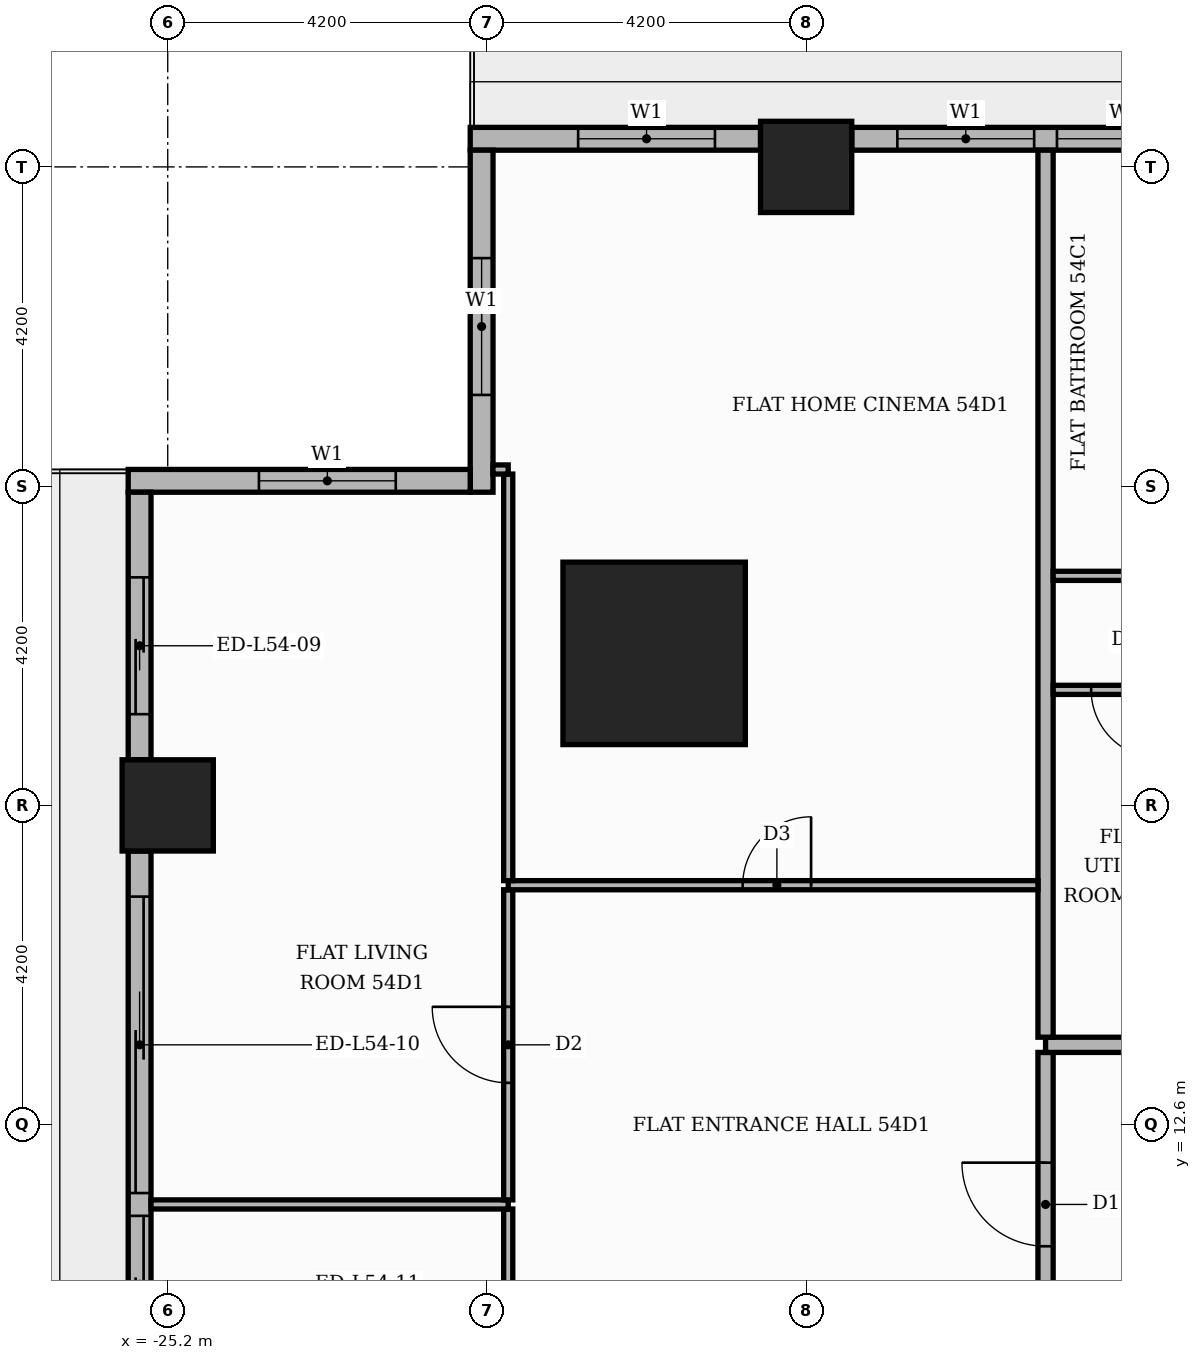
"""IFC4 building model, lengths in metres.
Left out: names, types, materials, properties, quantities, classifications, styles, units other than length and angle.
Written with IfcOpenShell. Run it as: python <this file> out.ifc"""

import sys

from ifc_helpers import new_model, si_unit, direction, frame, frame_2d, origin, origin_2d, place, context, subcontext, project, spatial, rectangle, extrude, element, fill, save


model = new_model("IFC4")
c1 = context("Model", 3, precision=1e-05, world=origin(), true_north=direction((0.0, 1.0)))
c2 = subcontext(c1, "Body", "Model", "MODEL_VIEW")
j1 = project(units=[si_unit("LENGTHUNIT", "METRE"), si_unit("PLANEANGLEUNIT", "RADIAN")], contexts=[c1])
p1 = place(None, origin())
s1 = spatial("IfcSite", under=j1, at=p1, CompositionType="ELEMENT")
p2 = place(p1, origin())
s2 = spatial("IfcBuilding", under=s1, at=p2, CompositionType="ELEMENT")
p3 = place(p2, frame((0.0, 0.0, 227.4)))
s3 = spatial("IfcBuildingStorey", under=s2, at=p3, CompositionType="ELEMENT", Elevation=227.4)
p4 = place(p3, frame((-18.8, 18.8, 0.0), z_axis=(0.0, 0.0, 1.0), x_axis=(1.0, 0.0, 0.0)))
e1 = element("IfcColumn", 1, at=p4, inside=s3, PredefinedType="COLUMN", context=c2, shape_type="SweptSolid", body=[
    extrude(rectangle(XDim=2.4, YDim=2.4, at=origin_2d()), origin(), (0.0, 0.0, 1.0), 3.9),
])
for number, where, z_axis, x_axis in (
    (2, (-16.8, 25.2, 0.0), (0.0, 0.0, 1.0), (1.0, 0.0, 0.0)),
    (3, (-25.2, 16.8, 0.0), (0.0, 0.0, 1.0), (1.0, 0.0, 0.0)),
):
    element("IfcColumn", number, at=place(p3, frame(where, z_axis=z_axis, x_axis=x_axis)), inside=s3, PredefinedType="COLUMN", context=c2, shape_type="SweptSolid", body=[
        extrude(rectangle(XDim=1.2, YDim=1.2, at=origin_2d()), origin(), (0.0, 0.0, 1.0), 3.9),
    ])
p5 = place(p3, frame((-9.0, 25.57, 0.0), z_axis=(0.0, 0.0, 1.0), x_axis=(-1.0, 0.0, 0.0)))
e4 = element("IfcWall", 4, at=p5, inside=s3, PredefinedType="STANDARD", context=c2, shape_type="SweptSolid", body=[
    extrude(rectangle(XDim=7.2, YDim=0.3, at=frame_2d((3.6, 0.0))), origin(), (0.0, 0.0, 1.0), 3.48),
])
p6 = place(p5, frame((0.6, 0.0, 0.9)))
e5 = element("IfcOpeningElement", 5, at=p6, cuts=e4, PredefinedType="OPENING", context=c2, shape_type="SweptSolid", body=[
    extrude(rectangle(XDim=1.8, YDim=2.1, at=frame_2d((0.9, 1.05))), frame((0.0, 0.16, 0.0), z_axis=(0.0, -1.0, 0.0), x_axis=(1.0, 0.0, 0.0)), (0.0, 0.0, 1.0), 0.32),
])
p7 = place(p5, frame((2.7, 0.0, 0.9)))
e6 = element("IfcOpeningElement", 6, at=p7, cuts=e4, PredefinedType="OPENING", context=c2, shape_type="SweptSolid", body=[
    extrude(rectangle(XDim=1.8, YDim=2.1, at=frame_2d((0.9, 1.05))), frame((0.0, 0.16, 0.0), z_axis=(0.0, -1.0, 0.0), x_axis=(1.0, 0.0, 0.0)), (0.0, 0.0, 1.0), 0.32),
])
p8 = place(p5, frame((4.8, 0.0, 0.9)))
e7 = element("IfcOpeningElement", 7, at=p8, cuts=e4, PredefinedType="OPENING", context=c2, shape_type="SweptSolid", body=[
    extrude(rectangle(XDim=1.8, YDim=2.1, at=frame_2d((0.9, 1.05))), frame((0.0, 0.16, 0.0), z_axis=(0.0, -1.0, 0.0), x_axis=(1.0, 0.0, 0.0)), (0.0, 0.0, 1.0), 0.32),
])
p9 = place(p3, frame((-17.4, 25.57, 0.0), z_axis=(0.0, 0.0, 1.0), x_axis=(-1.0, 0.0, 0.0)))
e8 = element("IfcWall", 8, at=p9, inside=s3, PredefinedType="STANDARD", context=c2, shape_type="SweptSolid", body=[
    extrude(rectangle(XDim=3.82, YDim=0.3, at=frame_2d((1.91, 0.0))), origin(), (0.0, 0.0, 1.0), 3.48),
])
p10 = place(p9, frame((0.6, 0.0, 0.9)))
e9 = element("IfcOpeningElement", 9, at=p10, cuts=e8, PredefinedType="OPENING", context=c2, shape_type="SweptSolid", body=[
    extrude(rectangle(XDim=1.8, YDim=2.1, at=frame_2d((0.9, 1.05))), frame((0.0, 0.16, 0.0), z_axis=(0.0, -1.0, 0.0), x_axis=(1.0, 0.0, 0.0)), (0.0, 0.0, 1.0), 0.32),
])
p11 = place(p3, frame((-21.07, 25.42, 0.0), z_axis=(0.0, 0.0, 1.0), x_axis=(0.0, -1.0, 0.0)))
e10 = element("IfcWall", 10, at=p11, inside=s3, PredefinedType="STANDARD", context=c2, shape_type="SweptSolid", body=[
    extrude(rectangle(XDim=4.5, YDim=0.3, at=frame_2d((2.25, 0.0))), origin(), (0.0, 0.0, 1.0), 3.48),
])
p12 = place(p11, frame((1.42, 0.0, 0.9)))
e11 = element("IfcOpeningElement", 11, at=p12, cuts=e10, PredefinedType="OPENING", context=c2, shape_type="SweptSolid", body=[
    extrude(rectangle(XDim=1.8, YDim=2.1, at=frame_2d((0.9, 1.05))), frame((0.0, 0.16, 0.0), z_axis=(0.0, -1.0, 0.0), x_axis=(1.0, 0.0, 0.0)), (0.0, 0.0, 1.0), 0.32),
])
p13 = place(p3, frame((-21.22, 21.07, 0.0), z_axis=(0.0, 0.0, 1.0), x_axis=(-1.0, 0.0, 0.0)))
e12 = element("IfcWall", 12, at=p13, inside=s3, PredefinedType="STANDARD", context=c2, shape_type="SweptSolid", body=[
    extrude(rectangle(XDim=4.5, YDim=0.3, at=frame_2d((2.25, 0.0))), origin(), (0.0, 0.0, 1.0), 3.48),
])
p14 = place(p13, frame((0.98, 0.0, 0.9)))
e13 = element("IfcOpeningElement", 13, at=p14, cuts=e12, PredefinedType="OPENING", context=c2, shape_type="SweptSolid", body=[
    extrude(rectangle(XDim=1.8, YDim=2.1, at=frame_2d((0.9, 1.05))), frame((0.0, 0.16, 0.0), z_axis=(0.0, -1.0, 0.0), x_axis=(1.0, 0.0, 0.0)), (0.0, 0.0, 1.0), 0.32),
])
p15 = place(p3, frame((-25.57, 20.92, 0.0), z_axis=(0.0, 0.0, 1.0), x_axis=(0.0, -1.0, 0.0)))
e14 = element("IfcWall", 14, at=p15, inside=s3, PredefinedType="STANDARD", context=c2, shape_type="SweptSolid", body=[
    extrude(rectangle(XDim=3.52, YDim=0.3, at=frame_2d((1.76, 0.0))), origin(), (0.0, 0.0, 1.0), 3.48),
])
p16 = place(p15, frame((1.12, 0.0, 0.0)))
e15 = element("IfcOpeningElement", 15, at=p16, cuts=e14, PredefinedType="OPENING", context=c2, shape_type="SweptSolid", body=[
    extrude(rectangle(XDim=1.8, YDim=2.4, at=frame_2d((0.9, 1.2))), frame((0.0, 0.16, 0.0), z_axis=(0.0, -1.0, 0.0), x_axis=(1.0, 0.0, 0.0)), (0.0, 0.0, 1.0), 0.32),
])
p17 = place(p3, frame((-25.57, 16.2, 0.0), z_axis=(0.0, 0.0, 1.0), x_axis=(0.0, -1.0, 0.0)))
e16 = element("IfcWall", 16, at=p17, inside=s3, PredefinedType="STANDARD", context=c2, shape_type="SweptSolid", body=[
    extrude(rectangle(XDim=7.2, YDim=0.3, at=frame_2d((3.6, 0.0))), origin(), (0.0, 0.0, 1.0), 3.48),
])
p18 = place(p17, frame((0.6, 0.0, 0.0)))
e17 = element("IfcOpeningElement", 17, at=p18, cuts=e16, PredefinedType="OPENING", context=c2, shape_type="SweptSolid", body=[
    extrude(rectangle(XDim=3.9, YDim=2.4, at=frame_2d((1.95, 1.2))), frame((0.0, 0.16, 0.0), z_axis=(0.0, -1.0, 0.0), x_axis=(1.0, 0.0, 0.0)), (0.0, 0.0, 1.0), 0.32),
])
p19 = place(p17, frame((4.8, 0.0, 0.0)))
e18 = element("IfcOpeningElement", 18, at=p19, cuts=e16, PredefinedType="OPENING", context=c2, shape_type="SweptSolid", body=[
    extrude(rectangle(XDim=1.8, YDim=2.4, at=frame_2d((0.9, 1.2))), frame((0.0, 0.16, 0.0), z_axis=(0.0, -1.0, 0.0), x_axis=(1.0, 0.0, 0.0)), (0.0, 0.0, 1.0), 0.32),
])
p20 = place(p3, frame((-13.65, -13.55, 0.0), z_axis=(0.0, 0.0, 1.0), x_axis=(0.0, 1.0, 0.0)))
e19 = element("IfcWall", 19, at=p20, inside=s3, PredefinedType="PARTITIONING", context=c2, shape_type="SweptSolid", body=[
    extrude(rectangle(XDim=27.1, YDim=0.2, at=frame_2d((13.55, 0.0))), origin(), (0.0, 0.0, 1.0), 3.48),
])
p21 = place(p20, frame((24.55, 0.0, 0.0)))
e20 = element("IfcOpeningElement", 20, at=p21, cuts=e19, PredefinedType="OPENING", context=c2, shape_type="SweptSolid", body=[
    extrude(rectangle(XDim=1.1, YDim=2.4, at=frame_2d((0.55, 1.2))), frame((0.0, 0.11, 0.0), z_axis=(0.0, -1.0, 0.0), x_axis=(1.0, 0.0, 0.0)), (0.0, 0.0, 1.0), 0.22),
])
p22 = place(p3, frame((-20.72, 3.21, 0.0), z_axis=(0.0, 0.0, 1.0), x_axis=(0.0, 1.0, 0.0)))
e21 = element("IfcWall", 21, at=p22, inside=s3, PredefinedType="PARTITIONING", context=c2, shape_type="SweptSolid", body=[
    extrude(rectangle(XDim=8.28, YDim=0.12, at=frame_2d((4.14, 0.0))), origin(), (0.0, 0.0, 1.0), 3.48),
])
p23 = place(p22, frame((3.69, 0.0, 0.0)))
e22 = element("IfcOpeningElement", 22, at=p23, cuts=e21, PredefinedType="OPENING", context=c2, shape_type="SweptSolid", body=[
    extrude(rectangle(XDim=0.9, YDim=2.1, at=frame_2d((0.45, 1.05))), frame((0.0, 0.07, 0.0), z_axis=(0.0, -1.0, 0.0), x_axis=(1.0, 0.0, 0.0)), (0.0, 0.0, 1.0), 0.14),
])
p24 = place(p3, frame((-25.42, 11.55, 0.0), z_axis=(0.0, 0.0, 1.0), x_axis=(1.0, 0.0, 0.0)))
e23 = element("IfcWall", 23, at=p24, inside=s3, PredefinedType="PARTITIONING", context=c2, shape_type="SweptSolid", body=[
    extrude(rectangle(XDim=4.7, YDim=0.12, at=frame_2d((2.35, 0.0))), origin(), (0.0, 0.0, 1.0), 3.48),
])
p25 = place(p3, frame((-20.72, 11.61, 0.0), z_axis=(0.0, 0.0, 1.0), x_axis=(0.0, 1.0, 0.0)))
e24 = element("IfcWall", 24, at=p25, inside=s3, PredefinedType="PARTITIONING", context=c2, shape_type="SweptSolid", body=[
    extrude(rectangle(XDim=4.08, YDim=0.12, at=frame_2d((2.04, 0.0))), origin(), (0.0, 0.0, 1.0), 3.48),
])
p26 = place(p25, frame((1.54, 0.0, 0.0)))
e25 = element("IfcOpeningElement", 25, at=p26, cuts=e24, PredefinedType="OPENING", context=c2, shape_type="SweptSolid", body=[
    extrude(rectangle(XDim=1.0, YDim=2.1, at=frame_2d((0.5, 1.05))), frame((0.0, 0.07, 0.0), z_axis=(0.0, -1.0, 0.0), x_axis=(1.0, 0.0, 0.0)), (0.0, 0.0, 1.0), 0.14),
])
p27 = place(p3, frame((-13.65, 13.65, 0.0), z_axis=(0.0, 0.0, 1.0), x_axis=(1.0, 0.0, 0.0)))
e26 = element("IfcWall", 26, at=p27, inside=s3, PredefinedType="PARTITIONING", context=c2, shape_type="SweptSolid", body=[
    extrude(rectangle(XDim=34.07, YDim=0.2, at=frame_2d((17.035, 0.0))), origin(), (0.0, 0.0, 1.0), 3.48),
])
p28 = place(p27, frame((24.65, 0.0, 0.0)))
e27 = element("IfcOpeningElement", 27, at=p28, cuts=e26, PredefinedType="OPENING", context=c2, shape_type="SweptSolid", body=[
    extrude(rectangle(XDim=1.1, YDim=2.4, at=frame_2d((0.55, 1.2))), frame((0.0, 0.11, 0.0), z_axis=(0.0, -1.0, 0.0), x_axis=(1.0, 0.0, 0.0)), (0.0, 0.0, 1.0), 0.22),
])
p29 = place(p3, frame((-13.65, 13.75, 0.0), z_axis=(0.0, 0.0, 1.0), x_axis=(0.0, 1.0, 0.0)))
e28 = element("IfcWall", 28, at=p29, inside=s3, PredefinedType="PARTITIONING", context=c2, shape_type="SweptSolid", body=[
    extrude(rectangle(XDim=11.67, YDim=0.2, at=frame_2d((5.835, 0.0))), origin(), (0.0, 0.0, 1.0), 3.48),
])
p30 = place(p3, frame((-20.72, 15.75, 0.0), z_axis=(0.0, 0.0, 1.0), x_axis=(1.0, 0.0, 0.0)))
e29 = element("IfcWall", 29, at=p30, inside=s3, PredefinedType="PARTITIONING", context=c2, shape_type="SweptSolid", body=[
    extrude(rectangle(XDim=6.97, YDim=0.12, at=frame_2d((3.485, 0.0))), origin(), (0.0, 0.0, 1.0), 3.48),
])
p31 = place(p30, frame((3.085, 0.0, 0.0)))
e30 = element("IfcOpeningElement", 30, at=p31, cuts=e29, PredefinedType="OPENING", context=c2, shape_type="SweptSolid", body=[
    extrude(rectangle(XDim=0.9, YDim=2.1, at=frame_2d((0.45, 1.05))), frame((0.0, 0.07, 0.0), z_axis=(0.0, -1.0, 0.0), x_axis=(1.0, 0.0, 0.0)), (0.0, 0.0, 1.0), 0.14),
])
p32 = place(p3, frame((-20.72, 15.81, 0.0), z_axis=(0.0, 0.0, 1.0), x_axis=(0.0, 1.0, 0.0)))
e31 = element("IfcWall", 31, at=p32, inside=s3, PredefinedType="PARTITIONING", context=c2, shape_type="SweptSolid", body=[
    extrude(rectangle(XDim=5.349, YDim=0.12, at=frame_2d((2.674, 0.0))), origin(), (0.0, 0.0, 1.0), 3.48),
])
p33 = place(p3, frame((-13.55, 18.32, 0.0), z_axis=(0.0, 0.0, 1.0), x_axis=(1.0, 0.0, 0.0)))
e32 = element("IfcWall", 32, at=p33, inside=s3, PredefinedType="PARTITIONING", context=c2, shape_type="SweptSolid", body=[
    extrude(rectangle(XDim=23.0, YDim=0.12, at=frame_2d((11.5, 0.0))), origin(), (0.0, 0.0, 1.0), 3.48),
])
p34 = place(p33, frame((19.625, 0.0, 0.0)))
e33 = element("IfcOpeningElement", 33, at=p34, cuts=e32, PredefinedType="OPENING", context=c2, shape_type="SweptSolid", body=[
    extrude(rectangle(XDim=0.9, YDim=2.1, at=frame_2d((0.45, 1.05))), frame((0.0, 0.07, 0.0), z_axis=(0.0, -1.0, 0.0), x_axis=(1.0, 0.0, 0.0)), (0.0, 0.0, 1.0), 0.14),
])
p35 = place(p33, frame((14.45, 0.0, 0.0)))
e34 = element("IfcOpeningElement", 34, at=p35, cuts=e32, PredefinedType="OPENING", context=c2, shape_type="SweptSolid", body=[
    extrude(rectangle(XDim=0.9, YDim=2.1, at=frame_2d((0.45, 1.05))), frame((0.0, 0.07, 0.0), z_axis=(0.0, -1.0, 0.0), x_axis=(1.0, 0.0, 0.0)), (0.0, 0.0, 1.0), 0.14),
])
p36 = place(p33, frame((11.15, 0.0, 0.0)))
e35 = element("IfcOpeningElement", 35, at=p36, cuts=e32, PredefinedType="OPENING", context=c2, shape_type="SweptSolid", body=[
    extrude(rectangle(XDim=0.9, YDim=2.1, at=frame_2d((0.45, 1.05))), frame((0.0, 0.07, 0.0), z_axis=(0.0, -1.0, 0.0), x_axis=(1.0, 0.0, 0.0)), (0.0, 0.0, 1.0), 0.14),
])
p37 = place(p33, frame((8.0, 0.0, 0.0)))
e36 = element("IfcOpeningElement", 36, at=p37, cuts=e32, PredefinedType="OPENING", context=c2, shape_type="SweptSolid", body=[
    extrude(rectangle(XDim=0.9, YDim=2.1, at=frame_2d((0.45, 1.05))), frame((0.0, 0.07, 0.0), z_axis=(0.0, -1.0, 0.0), x_axis=(1.0, 0.0, 0.0)), (0.0, 0.0, 1.0), 0.14),
])
p38 = place(p33, frame((3.725, 0.0, 0.0)))
e37 = element("IfcOpeningElement", 37, at=p38, cuts=e32, PredefinedType="OPENING", context=c2, shape_type="SweptSolid", body=[
    extrude(rectangle(XDim=0.9, YDim=2.1, at=frame_2d((0.45, 1.05))), frame((0.0, 0.07, 0.0), z_axis=(0.0, -1.0, 0.0), x_axis=(1.0, 0.0, 0.0)), (0.0, 0.0, 1.0), 0.14),
])
p39 = place(p33, frame((0.5, 0.0, 0.0)))
e38 = element("IfcOpeningElement", 38, at=p39, cuts=e32, PredefinedType="OPENING", context=c2, shape_type="SweptSolid", body=[
    extrude(rectangle(XDim=0.9, YDim=2.1, at=frame_2d((0.45, 1.05))), frame((0.0, 0.07, 0.0), z_axis=(0.0, -1.0, 0.0), x_axis=(1.0, 0.0, 0.0)), (0.0, 0.0, 1.0), 0.14),
])
p40 = place(p3, frame((-13.55, 19.82, 0.0), z_axis=(0.0, 0.0, 1.0), x_axis=(1.0, 0.0, 0.0)))
e39 = element("IfcWall", 39, at=p40, inside=s3, PredefinedType="PARTITIONING", context=c2, shape_type="SweptSolid", body=[
    extrude(rectangle(XDim=31.15, YDim=0.12, at=frame_2d((15.575, 0.0))), origin(), (0.0, 0.0, 1.0), 3.48),
])
p41 = place(p40, frame((27.75, 0.0, 0.0)))
e40 = element("IfcOpeningElement", 40, at=p41, cuts=e39, PredefinedType="OPENING", context=c2, shape_type="SweptSolid", body=[
    extrude(rectangle(XDim=1.0, YDim=2.1, at=frame_2d((0.5, 1.05))), frame((0.0, 0.07, 0.0), z_axis=(0.0, -1.0, 0.0), x_axis=(1.0, 0.0, 0.0)), (0.0, 0.0, 1.0), 0.14),
])
p42 = place(p40, frame((24.65, 0.0, 0.0)))
e41 = element("IfcOpeningElement", 41, at=p42, cuts=e39, PredefinedType="OPENING", context=c2, shape_type="SweptSolid", body=[
    extrude(rectangle(XDim=0.9, YDim=2.1, at=frame_2d((0.45, 1.05))), frame((0.0, 0.07, 0.0), z_axis=(0.0, -1.0, 0.0), x_axis=(1.0, 0.0, 0.0)), (0.0, 0.0, 1.0), 0.14),
])
p43 = place(p40, frame((19.4, 0.0, 0.0)))
e42 = element("IfcOpeningElement", 42, at=p43, cuts=e39, PredefinedType="OPENING", context=c2, shape_type="SweptSolid", body=[
    extrude(rectangle(XDim=0.9, YDim=2.1, at=frame_2d((0.45, 1.05))), frame((0.0, 0.07, 0.0), z_axis=(0.0, -1.0, 0.0), x_axis=(1.0, 0.0, 0.0)), (0.0, 0.0, 1.0), 0.14),
])
p44 = place(p40, frame((9.95, 0.0, 0.0)))
e43 = element("IfcOpeningElement", 43, at=p44, cuts=e39, PredefinedType="OPENING", context=c2, shape_type="SweptSolid", body=[
    extrude(rectangle(XDim=0.9, YDim=2.1, at=frame_2d((0.45, 1.05))), frame((0.0, 0.07, 0.0), z_axis=(0.0, -1.0, 0.0), x_axis=(1.0, 0.0, 0.0)), (0.0, 0.0, 1.0), 0.14),
])
p45 = place(p40, frame((3.65, 0.0, 0.0)))
e44 = element("IfcOpeningElement", 44, at=p45, cuts=e39, PredefinedType="OPENING", context=c2, shape_type="SweptSolid", body=[
    extrude(rectangle(XDim=0.9, YDim=2.1, at=frame_2d((0.45, 1.05))), frame((0.0, 0.07, 0.0), z_axis=(0.0, -1.0, 0.0), x_axis=(1.0, 0.0, 0.0)), (0.0, 0.0, 1.0), 0.14),
])
p46 = place(p3, frame((-20.921, 21.219, 0.0), z_axis=(0.0, 0.0, 1.0), x_axis=(1.0, 0.0, 0.0)))
e45 = element("IfcWall", 45, at=p46, inside=s3, PredefinedType="PARTITIONING", context=c2, shape_type="SweptSolid", body=[
    extrude(rectangle(XDim=0.201, YDim=0.12, at=frame_2d((0.101, 0.0))), origin(), (0.0, 0.0, 1.0), 3.48),
])
p47 = place(p7, origin())
e46 = element("IfcWindow", 46, at=p47, inside=s3, PartitioningType="SINGLE_PANEL", PredefinedType="WINDOW", context=c2, shape_type="SweptSolid", body=[
    extrude(rectangle(XDim=1.8, YDim=2.1, at=frame_2d((0.9, 1.05))), frame((0.0, 0.03, 0.0), z_axis=(0.0, -1.0, 0.0), x_axis=(1.0, 0.0, 0.0)), (0.0, 0.0, 1.0), 0.06),
])
fill(e6, e46)
p48 = place(p8, origin())
e47 = element("IfcWindow", 47, at=p48, inside=s3, PartitioningType="SINGLE_PANEL", PredefinedType="WINDOW", context=c2, shape_type="SweptSolid", body=[
    extrude(rectangle(XDim=1.8, YDim=2.1, at=frame_2d((0.9, 1.05))), frame((0.0, 0.03, 0.0), z_axis=(0.0, -1.0, 0.0), x_axis=(1.0, 0.0, 0.0)), (0.0, 0.0, 1.0), 0.06),
])
fill(e7, e47)
p49 = place(p10, origin())
e48 = element("IfcWindow", 48, at=p49, inside=s3, PartitioningType="SINGLE_PANEL", PredefinedType="WINDOW", context=c2, shape_type="SweptSolid", body=[
    extrude(rectangle(XDim=1.8, YDim=2.1, at=frame_2d((0.9, 1.05))), frame((0.0, 0.03, 0.0), z_axis=(0.0, -1.0, 0.0), x_axis=(1.0, 0.0, 0.0)), (0.0, 0.0, 1.0), 0.06),
])
fill(e9, e48)
p50 = place(p12, origin())
e49 = element("IfcWindow", 49, at=p50, inside=s3, PartitioningType="SINGLE_PANEL", PredefinedType="WINDOW", context=c2, shape_type="SweptSolid", body=[
    extrude(rectangle(XDim=1.8, YDim=2.1, at=frame_2d((0.9, 1.05))), frame((0.0, 0.03, 0.0), z_axis=(0.0, -1.0, 0.0), x_axis=(1.0, 0.0, 0.0)), (0.0, 0.0, 1.0), 0.06),
])
fill(e11, e49)
p51 = place(p14, origin())
e50 = element("IfcWindow", 50, at=p51, inside=s3, PartitioningType="SINGLE_PANEL", PredefinedType="WINDOW", context=c2, shape_type="SweptSolid", body=[
    extrude(rectangle(XDim=1.8, YDim=2.1, at=frame_2d((0.9, 1.05))), frame((0.0, 0.03, 0.0), z_axis=(0.0, -1.0, 0.0), x_axis=(1.0, 0.0, 0.0)), (0.0, 0.0, 1.0), 0.06),
])
fill(e13, e50)
p52 = place(p16, origin())
e51 = element("IfcDoor", 51, at=p52, inside=s3, OperationType="SLIDING_TO_RIGHT", PredefinedType="DOOR", context=c2, shape_type="SweptSolid", body=[
    extrude(rectangle(XDim=1.8, YDim=2.4, at=frame_2d((0.9, 1.2))), frame((0.0, 0.025, 0.0), z_axis=(0.0, -1.0, 0.0), x_axis=(1.0, 0.0, 0.0)), (0.0, 0.0, 1.0), 0.05),
])
fill(e15, e51)
p53 = place(p18, origin())
e52 = element("IfcDoor", 52, at=p53, inside=s3, OperationType="SLIDING_TO_LEFT", PredefinedType="DOOR", context=c2, shape_type="SweptSolid", body=[
    extrude(rectangle(XDim=3.9, YDim=2.4, at=frame_2d((1.95, 1.2))), frame((0.0, 0.025, 0.0), z_axis=(0.0, -1.0, 0.0), x_axis=(1.0, 0.0, 0.0)), (0.0, 0.0, 1.0), 0.05),
])
fill(e17, e52)
p54 = place(p19, origin())
e53 = element("IfcDoor", 53, at=p54, inside=s3, OperationType="SLIDING_TO_RIGHT", PredefinedType="DOOR", context=c2, shape_type="SweptSolid", body=[
    extrude(rectangle(XDim=1.8, YDim=2.4, at=frame_2d((0.9, 1.2))), frame((0.0, 0.025, 0.0), z_axis=(0.0, -1.0, 0.0), x_axis=(1.0, 0.0, 0.0)), (0.0, 0.0, 1.0), 0.05),
])
fill(e18, e53)
p55 = place(p39, frame((0.9, 0.0, 0.0), z_axis=(0.0, 0.0, 1.0), x_axis=(-1.0, 0.0, 0.0)))
e54 = element("IfcDoor", 54, at=p55, inside=s3, OperationType="SINGLE_SWING_RIGHT", PredefinedType="DOOR", context=c2, shape_type="SweptSolid", body=[
    extrude(rectangle(XDim=0.9, YDim=2.1, at=frame_2d((0.45, 1.05))), frame((0.0, 0.025, 0.0), z_axis=(0.0, -1.0, 0.0), x_axis=(1.0, 0.0, 0.0)), (0.0, 0.0, 1.0), 0.05),
])
fill(e38, e54)
p56 = place(p21, origin())
e55 = element("IfcDoor", 55, at=p56, inside=s3, OperationType="SINGLE_SWING_RIGHT", PredefinedType="DOOR", context=c2, shape_type="SweptSolid", body=[
    extrude(rectangle(XDim=1.1, YDim=2.4, at=frame_2d((0.55, 1.2))), frame((0.0, 0.025, 0.0), z_axis=(0.0, -1.0, 0.0), x_axis=(1.0, 0.0, 0.0)), (0.0, 0.0, 1.0), 0.05),
])
fill(e20, e55)
p57 = place(p31, origin())
e56 = element("IfcDoor", 56, at=p57, inside=s3, OperationType="SINGLE_SWING_RIGHT", PredefinedType="DOOR", context=c2, shape_type="SweptSolid", body=[
    extrude(rectangle(XDim=0.9, YDim=2.1, at=frame_2d((0.45, 1.05))), frame((0.0, 0.025, 0.0), z_axis=(0.0, -1.0, 0.0), x_axis=(1.0, 0.0, 0.0)), (0.0, 0.0, 1.0), 0.05),
])
fill(e30, e56)
p58 = place(p26, origin())
e57 = element("IfcDoor", 57, at=p58, inside=s3, OperationType="SINGLE_SWING_RIGHT", PredefinedType="DOOR", context=c2, shape_type="SweptSolid", body=[
    extrude(rectangle(XDim=1.0, YDim=2.1, at=frame_2d((0.5, 1.05))), frame((0.0, 0.025, 0.0), z_axis=(0.0, -1.0, 0.0), x_axis=(1.0, 0.0, 0.0)), (0.0, 0.0, 1.0), 0.05),
])
fill(e25, e57)
save(model, sys.argv[1])
